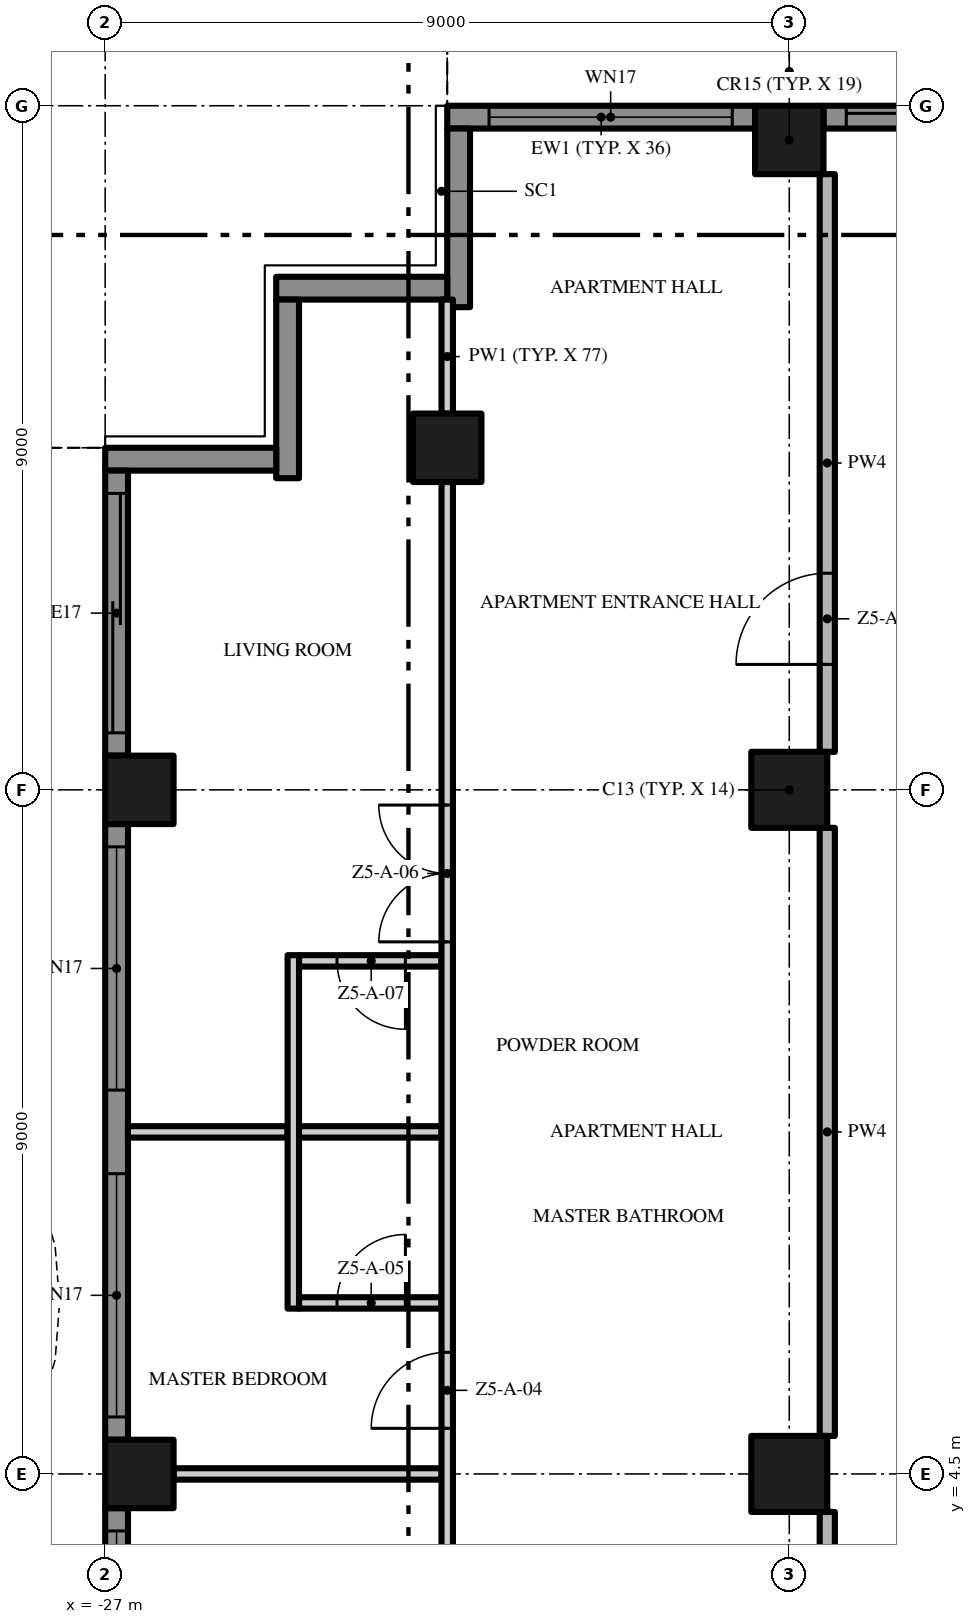
"""IFC4 building model, lengths in metres.
Left out: names, types, materials, properties, quantities, classifications, styles, units other than length and angle.
Written with IfcOpenShell. Run it as: python <this file> out.ifc"""

import sys

from ifc_helpers import new_model, si_unit, direction, frame, frame_2d, origin, origin_2d, place, context, subcontext, project, spatial, polyline, rectangle, outline, extrude, element, fill, save


model = new_model("IFC4")
c1 = context("Model", 3, precision=1e-05, world=origin(), true_north=direction((0.0, 1.0)))
c2 = subcontext(c1, "Body", "Model", "MODEL_VIEW")
j1 = project(units=[si_unit("LENGTHUNIT", "METRE"), si_unit("PLANEANGLEUNIT", "RADIAN")], contexts=[c1])
p1 = place(None, origin())
s1 = spatial("IfcSite", under=j1, at=p1, CompositionType="ELEMENT")
p2 = place(p1, origin())
s2 = spatial("IfcBuilding", under=s1, at=p2, CompositionType="ELEMENT")
p3 = place(p2, frame((0.0, 0.0, 242.6)))
s3 = spatial("IfcBuildingStorey", under=s2, at=p3, CompositionType="ELEMENT", Elevation=242.6)
p4 = place(p3, frame((-18.0, 13.5, 0.0), z_axis=(0.0, 0.0, 1.0), x_axis=(1.0, 0.0, 0.0)))
e1 = element("IfcColumn", 1, at=p4, inside=s3, PredefinedType="COLUMN", context=c2, shape_type="SweptSolid", body=[
    extrude(rectangle(XDim=1.0, YDim=1.0, at=origin_2d()), origin(), (0.0, 0.0, 1.0), 3.5),
])
p5 = place(p3, frame((-18.0, 22.05, 0.0), z_axis=(0.0, 0.0, 1.0), x_axis=(1.0, 0.0, 0.0)))
e2 = element("IfcColumn", 2, at=p5, inside=s3, PredefinedType="COLUMN", context=c2, shape_type="SweptSolid", body=[
    extrude(rectangle(XDim=0.9, YDim=0.9, at=origin_2d()), origin(), (0.0, 0.0, 1.0), 3.5),
])
p6 = place(p3, frame((-18.0, 4.5, 0.0), z_axis=(0.0, 0.0, 1.0), x_axis=(1.0, 0.0, 0.0)))
e3 = element("IfcColumn", 3, at=p6, inside=s3, PredefinedType="COLUMN", context=c2, shape_type="SweptSolid", body=[
    extrude(rectangle(XDim=1.0, YDim=1.0, at=origin_2d()), origin(), (0.0, 0.0, 1.0), 3.5),
])
for number, where, z_axis, x_axis in (
    (4, (-26.55, 13.5, 0.0), (0.0, 0.0, 1.0), (1.0, 0.0, 0.0)),
    (5, (-22.5, 18.0, 0.0), (0.0, 0.0, 1.0), (1.0, 0.0, 0.0)),
    (6, (-26.55, 4.5, 0.0), (0.0, 0.0, 1.0), (1.0, 0.0, 0.0)),
):
    element("IfcColumn", number, at=place(p3, frame(where, z_axis=z_axis, x_axis=x_axis)), inside=s3, PredefinedType="COLUMN", context=c2, shape_type="SweptSolid", body=[
        extrude(rectangle(XDim=0.9, YDim=0.9, at=origin_2d()), origin(), (0.0, 0.0, 1.0), 3.5),
    ])
p7 = place(p3, frame((-17.55, 22.35, 0.0), z_axis=(0.0, 0.0, 1.0), x_axis=(1.0, 0.0, 0.0)))
e7 = element("IfcWall", 7, at=p7, inside=s3, PredefinedType="SOLIDWALL", context=c2, shape_type="SweptSolid", body=[
    extrude(rectangle(XDim=4.05, YDim=0.3, at=frame_2d((2.025, 0.0))), origin(), (0.0, 0.0, 1.0), 3.5),
])
p8 = place(p7, frame((0.3, 0.0, 0.0)))
e8 = element("IfcOpeningElement", 8, at=p8, cuts=e7, PredefinedType="OPENING", context=c2, shape_type="SweptSolid", body=[
    extrude(rectangle(XDim=3.2, YDim=2.4, at=frame_2d((1.6, 1.2))), frame((0.0, 0.16, 0.0), z_axis=(0.0, -1.0, 0.0), x_axis=(1.0, 0.0, 0.0)), (0.0, 0.0, 1.0), 0.32),
])
p9 = place(p3, frame((-22.5, 22.35, 0.0), z_axis=(0.0, 0.0, 1.0), x_axis=(1.0, 0.0, 0.0)))
e9 = element("IfcWall", 9, at=p9, inside=s3, PredefinedType="SOLIDWALL", context=c2, shape_type="SweptSolid", body=[
    extrude(rectangle(XDim=4.05, YDim=0.3, at=frame_2d((2.025, 0.0))), origin(), (0.0, 0.0, 1.0), 3.5),
])
p10 = place(p9, frame((0.55, 0.0, 0.45)))
e10 = element("IfcOpeningElement", 10, at=p10, cuts=e9, PredefinedType="OPENING", context=c2, shape_type="SweptSolid", body=[
    extrude(rectangle(XDim=3.2, YDim=2.65, at=frame_2d((1.6, 1.325))), frame((0.0, 0.16, 0.0), z_axis=(0.0, -1.0, 0.0), x_axis=(1.0, 0.0, 0.0)), (0.0, 0.0, 1.0), 0.32),
])
p11 = place(p3, frame((-22.35, 19.85, 0.0), z_axis=(0.0, 0.0, 1.0), x_axis=(0.0, 1.0, 0.0)))
e11 = element("IfcWall", 11, at=p11, inside=s3, PredefinedType="SOLIDWALL", context=c2, shape_type="SweptSolid", body=[
    extrude(rectangle(XDim=2.35, YDim=0.3, at=frame_2d((1.175, 0.0))), origin(), (0.0, 0.0, 1.0), 3.5),
])
p12 = place(p3, frame((-24.75, 20.1, 0.0), z_axis=(0.0, 0.0, 1.0), x_axis=(1.0, 0.0, 0.0)))
e12 = element("IfcWall", 12, at=p12, inside=s3, PredefinedType="SOLIDWALL", context=c2, shape_type="SweptSolid", body=[
    extrude(rectangle(XDim=2.25, YDim=0.3, at=frame_2d((1.125, 0.0))), origin(), (0.0, 0.0, 1.0), 3.5),
])
p13 = place(p3, frame((-24.6, 17.6, 0.0), z_axis=(0.0, 0.0, 1.0), x_axis=(0.0, 1.0, 0.0)))
e13 = element("IfcWall", 13, at=p13, inside=s3, PredefinedType="SOLIDWALL", context=c2, shape_type="SweptSolid", body=[
    extrude(rectangle(XDim=2.35, YDim=0.3, at=frame_2d((1.175, 0.0))), origin(), (0.0, 0.0, 1.0), 3.5),
])
p14 = place(p3, frame((-27.0, 17.85, 0.0), z_axis=(0.0, 0.0, 1.0), x_axis=(1.0, 0.0, 0.0)))
e14 = element("IfcWall", 14, at=p14, inside=s3, PredefinedType="SOLIDWALL", context=c2, shape_type="SweptSolid", body=[
    extrude(rectangle(XDim=2.25, YDim=0.3, at=frame_2d((1.125, 0.0))), origin(), (0.0, 0.0, 1.0), 3.5),
])
p15 = place(p3, frame((-26.85, 13.95, 0.0), z_axis=(0.0, 0.0, 1.0), x_axis=(0.0, 1.0, 0.0)))
e15 = element("IfcWall", 15, at=p15, inside=s3, PredefinedType="SOLIDWALL", context=c2, shape_type="SweptSolid", body=[
    extrude(rectangle(XDim=3.75, YDim=0.3, at=frame_2d((1.875, 0.0))), origin(), (0.0, 0.0, 1.0), 3.5),
])
p16 = place(p15, frame((0.3, 0.0, 0.0)))
e16 = element("IfcOpeningElement", 16, at=p16, cuts=e15, PredefinedType="OPENING", context=c2, shape_type="SweptSolid", body=[
    extrude(rectangle(XDim=3.15, YDim=2.4, at=frame_2d((1.575, 1.2))), frame((0.0, 0.16, 0.0), z_axis=(0.0, -1.0, 0.0), x_axis=(1.0, 0.0, 0.0)), (0.0, 0.0, 1.0), 0.32),
])
p17 = place(p3, frame((-26.85, 4.95, 0.0), z_axis=(0.0, 0.0, 1.0), x_axis=(0.0, 1.0, 0.0)))
e17 = element("IfcWall", 17, at=p17, inside=s3, PredefinedType="SOLIDWALL", context=c2, shape_type="SweptSolid", body=[
    extrude(rectangle(XDim=8.1, YDim=0.3, at=frame_2d((4.05, 0.0))), origin(), (0.0, 0.0, 1.0), 3.5),
])
p18 = place(p17, frame((4.6, 0.0, 0.45)))
e18 = element("IfcOpeningElement", 18, at=p18, cuts=e17, PredefinedType="OPENING", context=c2, shape_type="SweptSolid", body=[
    extrude(rectangle(XDim=3.2, YDim=2.65, at=frame_2d((1.6, 1.325))), frame((0.0, 0.16, 0.0), z_axis=(0.0, -1.0, 0.0), x_axis=(1.0, 0.0, 0.0)), (0.0, 0.0, 1.0), 0.32),
])
p19 = place(p17, frame((0.3, 0.0, 0.45)))
e19 = element("IfcOpeningElement", 19, at=p19, cuts=e17, PredefinedType="OPENING", context=c2, shape_type="SweptSolid", body=[
    extrude(rectangle(XDim=3.2, YDim=2.65, at=frame_2d((1.6, 1.325))), frame((0.0, 0.16, 0.0), z_axis=(0.0, -1.0, 0.0), x_axis=(1.0, 0.0, 0.0)), (0.0, 0.0, 1.0), 0.32),
])
p20 = place(p3, frame((-26.85, -4.05, 0.0), z_axis=(0.0, 0.0, 1.0), x_axis=(0.0, 1.0, 0.0)))
e20 = element("IfcWall", 20, at=p20, inside=s3, PredefinedType="SOLIDWALL", context=c2, shape_type="SweptSolid", body=[
    extrude(rectangle(XDim=8.1, YDim=0.3, at=frame_2d((4.05, 0.0))), origin(), (0.0, 0.0, 1.0), 3.5),
])
p21 = place(p20, frame((4.6, 0.0, 0.45)))
e21 = element("IfcOpeningElement", 21, at=p21, cuts=e20, PredefinedType="OPENING", context=c2, shape_type="SweptSolid", body=[
    extrude(rectangle(XDim=3.2, YDim=2.65, at=frame_2d((1.6, 1.325))), frame((0.0, 0.16, 0.0), z_axis=(0.0, -1.0, 0.0), x_axis=(1.0, 0.0, 0.0)), (0.0, 0.0, 1.0), 0.32),
])
p22 = place(p20, frame((0.3, 0.0, 0.0)))
e22 = element("IfcOpeningElement", 22, at=p22, cuts=e20, PredefinedType="OPENING", context=c2, shape_type="SweptSolid", body=[
    extrude(rectangle(XDim=3.2, YDim=2.4, at=frame_2d((1.6, 1.2))), frame((0.0, 0.16, 0.0), z_axis=(0.0, -1.0, 0.0), x_axis=(1.0, 0.0, 0.0)), (0.0, 0.0, 1.0), 0.32),
])
p23 = place(p3, origin())
e23 = element("IfcWall", 23, at=p23, inside=s3, PredefinedType="USERDEFINED", context=c2, shape_type="SweptSolid", body=[
    extrude(outline(polyline([(-28.8, 18.0), (-29.505, 16.5), (-29.941, 15.0), (-30.0, 14.25), (-29.941, 13.5), (-29.505, 12.0), (-28.8, 10.5), (-28.095, 9.0), (-27.659, 7.5), (-27.6, 6.75), (-27.659, 6.0), (-28.095, 4.5), (-28.8, 3.0), (-29.505, 1.5), (-29.941, 0.0), (-30.0, -0.75), (-29.941, -1.5), (-29.505, -3.0), (-28.8, -4.5), (-28.095, -6.0), (-27.659, -7.5), (-27.6, -8.25), (-27.659, -9.0), (-28.095, -10.5), (-28.8, -12.0), (-29.505, -13.5), (-29.941, -15.0), (-30.0, -15.75), (-29.941, -16.5), (-29.505, -18.0), (-29.265, -17.93), (-29.694, -16.455), (-29.749, -15.75), (-29.694, -15.045), (-29.271, -13.589), (-28.574, -12.106), (-27.86, -10.589), (-27.411, -9.045), (-27.349, -8.25), (-27.411, -7.455), (-27.86, -5.911), (-28.574, -4.394), (-29.271, -2.911), (-29.694, -1.455), (-29.749, -0.75), (-29.694, -0.045), (-29.271, 1.411), (-28.574, 2.894), (-27.86, 4.411), (-27.411, 5.955), (-27.349, 6.75), (-27.411, 7.545), (-27.86, 9.089), (-28.574, 10.606), (-29.271, 12.089), (-29.694, 13.545), (-29.749, 14.25), (-29.694, 14.955), (-29.271, 16.411), (-28.574, 17.894), (-28.8, 18.0)])), origin(), (0.0, 0.0, 1.0), 0.9),
])
p24 = place(p3, frame((-26.1, 4.5, 0.0), z_axis=(0.0, 0.0, 1.0), x_axis=(1.0, 0.0, 0.0)))
e24 = element("IfcWall", 24, at=p24, inside=s3, PredefinedType="PARTITIONING", context=c2, shape_type="SweptSolid", body=[
    extrude(rectangle(XDim=3.525, YDim=0.15, at=frame_2d((1.762, 0.0))), origin(), (0.0, 0.0, 1.0), 3.5),
])
p25 = place(p3, frame((-24.45, 6.75, 0.0), z_axis=(0.0, 0.0, 1.0), x_axis=(1.0, 0.0, 0.0)))
e25 = element("IfcWall", 25, at=p25, inside=s3, PredefinedType="PARTITIONING", context=c2, shape_type="SweptSolid", body=[
    extrude(rectangle(XDim=1.875, YDim=0.15, at=frame_2d((0.938, 0.0))), origin(), (0.0, 0.0, 1.0), 3.5),
])
p26 = place(p25, frame((0.5, 0.0, 0.0)))
e26 = element("IfcOpeningElement", 26, at=p26, cuts=e25, PredefinedType="OPENING", context=c2, shape_type="SweptSolid", body=[
    extrude(rectangle(XDim=0.9, YDim=2.1, at=frame_2d((0.45, 1.05))), frame((0.0, 0.085, 0.0), z_axis=(0.0, -1.0, 0.0), x_axis=(1.0, 0.0, 0.0)), (0.0, 0.0, 1.0), 0.17),
])
p27 = place(p3, frame((-26.7, 9.0, 0.0), z_axis=(0.0, 0.0, 1.0), x_axis=(1.0, 0.0, 0.0)))
e27 = element("IfcWall", 27, at=p27, inside=s3, PredefinedType="PARTITIONING", context=c2, shape_type="SweptSolid", body=[
    extrude(rectangle(XDim=2.1, YDim=0.15, at=frame_2d((1.05, 0.0))), origin(), (0.0, 0.0, 1.0), 3.5),
])
p28 = place(p3, frame((-24.45, 9.0, 0.0), z_axis=(0.0, 0.0, 1.0), x_axis=(1.0, 0.0, 0.0)))
e28 = element("IfcWall", 28, at=p28, inside=s3, PredefinedType="PARTITIONING", context=c2, shape_type="SweptSolid", body=[
    extrude(rectangle(XDim=1.875, YDim=0.15, at=frame_2d((0.938, 0.0))), origin(), (0.0, 0.0, 1.0), 3.5),
])
p29 = place(p3, frame((-22.575, 11.25, 0.0), z_axis=(0.0, 0.0, 1.0), x_axis=(-1.0, 0.0, 0.0)))
e29 = element("IfcWall", 29, at=p29, inside=s3, PredefinedType="PARTITIONING", context=c2, shape_type="SweptSolid", body=[
    extrude(rectangle(XDim=1.875, YDim=0.15, at=frame_2d((0.938, 0.0))), origin(), (0.0, 0.0, 1.0), 3.5),
])
p30 = place(p29, frame((0.475, 0.0, 0.0)))
e30 = element("IfcOpeningElement", 30, at=p30, cuts=e29, PredefinedType="OPENING", context=c2, shape_type="SweptSolid", body=[
    extrude(rectangle(XDim=0.9, YDim=2.1, at=frame_2d((0.45, 1.05))), frame((0.0, 0.085, 0.0), z_axis=(0.0, -1.0, 0.0), x_axis=(1.0, 0.0, 0.0)), (0.0, 0.0, 1.0), 0.17),
])
p31 = place(p3, frame((-24.525, 6.675, 0.0), z_axis=(0.0, 0.0, 1.0), x_axis=(0.0, 1.0, 0.0)))
e31 = element("IfcWall", 31, at=p31, inside=s3, PredefinedType="PARTITIONING", context=c2, shape_type="SweptSolid", body=[
    extrude(rectangle(XDim=4.65, YDim=0.15, at=frame_2d((2.325, 0.0))), origin(), (0.0, 0.0, 1.0), 3.5),
])
p32 = place(p3, frame((-22.5, 0.1, 0.0), z_axis=(0.0, 0.0, 1.0), x_axis=(0.0, 1.0, 0.0)))
e32 = element("IfcWall", 32, at=p32, inside=s3, PredefinedType="PARTITIONING", context=c2, shape_type="SweptSolid", body=[
    extrude(rectangle(XDim=17.45, YDim=0.15, at=frame_2d((8.725, 0.0))), origin(), (0.0, 0.0, 1.0), 3.5),
])
p33 = place(p32, frame((1.65, 0.0, 0.0)))
e33 = element("IfcOpeningElement", 33, at=p33, cuts=e32, PredefinedType="OPENING", context=c2, shape_type="SweptSolid", body=[
    extrude(rectangle(XDim=1.0, YDim=2.4, at=frame_2d((0.5, 1.2))), frame((0.0, 0.085, 0.0), z_axis=(0.0, -1.0, 0.0), x_axis=(1.0, 0.0, 0.0)), (0.0, 0.0, 1.0), 0.17),
])
p34 = place(p32, frame((5.0, 0.0, 0.0)))
e34 = element("IfcOpeningElement", 34, at=p34, cuts=e32, PredefinedType="OPENING", context=c2, shape_type="SweptSolid", body=[
    extrude(rectangle(XDim=1.0, YDim=2.4, at=frame_2d((0.5, 1.2))), frame((0.0, 0.085, 0.0), z_axis=(0.0, -1.0, 0.0), x_axis=(1.0, 0.0, 0.0)), (0.0, 0.0, 1.0), 0.17),
])
p35 = place(p32, frame((11.4, 0.0, 0.0)))
e35 = element("IfcOpeningElement", 35, at=p35, cuts=e32, PredefinedType="OPENING", context=c2, shape_type="SweptSolid", body=[
    extrude(rectangle(XDim=1.8, YDim=2.4, at=frame_2d((0.9, 1.2))), frame((0.0, 0.085, 0.0), z_axis=(0.0, -1.0, 0.0), x_axis=(1.0, 0.0, 0.0)), (0.0, 0.0, 1.0), 0.17),
])
p36 = place(p3, frame((-22.5, 18.45, 0.0), z_axis=(0.0, 0.0, 1.0), x_axis=(0.0, 1.0, 0.0)))
e36 = element("IfcWall", 36, at=p36, inside=s3, PredefinedType="PARTITIONING", context=c2, shape_type="SweptSolid", body=[
    extrude(rectangle(XDim=1.5, YDim=0.15, at=frame_2d((0.75, 0.0))), origin(), (0.0, 0.0, 1.0), 3.5),
])
p37 = place(p3, frame((-17.5, -0.2, 0.0), z_axis=(0.0, 0.0, 1.0), x_axis=(0.0, 1.0, 0.0)))
e37 = element("IfcWall", 37, at=p37, inside=s3, PredefinedType="PARTITIONING", context=c2, shape_type="SweptSolid", body=[
    extrude(rectangle(XDim=4.2, YDim=0.2, at=frame_2d((2.1, 0.0))), origin(), (0.0, 0.0, 1.0), 3.5),
])
p38 = place(p3, frame((-17.5, 5.0, 0.0), z_axis=(0.0, 0.0, 1.0), x_axis=(0.0, 1.0, 0.0)))
e38 = element("IfcWall", 38, at=p38, inside=s3, PredefinedType="PARTITIONING", context=c2, shape_type="SweptSolid", body=[
    extrude(rectangle(XDim=8.0, YDim=0.2, at=frame_2d((4.0, 0.0))), origin(), (0.0, 0.0, 1.0), 3.5),
])
p39 = place(p3, frame((-17.5, 14.0, 0.0), z_axis=(0.0, 0.0, 1.0), x_axis=(0.0, 1.0, 0.0)))
e39 = element("IfcWall", 39, at=p39, inside=s3, PredefinedType="PARTITIONING", context=c2, shape_type="SweptSolid", body=[
    extrude(rectangle(XDim=7.6, YDim=0.2, at=frame_2d((3.8, 0.0))), origin(), (0.0, 0.0, 1.0), 3.5),
])
p40 = place(p39, frame((1.15, 0.0, 0.0)))
e40 = element("IfcOpeningElement", 40, at=p40, cuts=e39, PredefinedType="OPENING", context=c2, shape_type="SweptSolid", body=[
    extrude(rectangle(XDim=1.2, YDim=2.4, at=frame_2d((0.6, 1.2))), frame((0.0, 0.11, 0.0), z_axis=(0.0, -1.0, 0.0), x_axis=(1.0, 0.0, 0.0)), (0.0, 0.0, 1.0), 0.22),
])
p41 = place(p8, origin())
e41 = element("IfcDoor", 41, at=p41, inside=s3, OperationType="SINGLE_SWING_LEFT", PredefinedType="DOOR", context=c2, shape_type="SweptSolid", body=[
    extrude(rectangle(XDim=3.2, YDim=2.4, at=frame_2d((1.6, 1.2))), frame((0.0, 0.025, 0.0), z_axis=(0.0, -1.0, 0.0), x_axis=(1.0, 0.0, 0.0)), (0.0, 0.0, 1.0), 0.05),
])
fill(e8, e41)
p42 = place(p10, origin())
e42 = element("IfcWindow", 42, at=p42, inside=s3, PartitioningType="SINGLE_PANEL", PredefinedType="WINDOW", context=c2, shape_type="SweptSolid", body=[
    extrude(rectangle(XDim=3.2, YDim=2.65, at=frame_2d((1.6, 1.325))), frame((0.0, 0.03, 0.0), z_axis=(0.0, -1.0, 0.0), x_axis=(1.0, 0.0, 0.0)), (0.0, 0.0, 1.0), 0.06),
])
fill(e10, e42)
p43 = place(p16, origin())
e43 = element("IfcDoor", 43, at=p43, inside=s3, OperationType="SINGLE_SWING_LEFT", PredefinedType="DOOR", context=c2, shape_type="SweptSolid", body=[
    extrude(rectangle(XDim=3.15, YDim=2.4, at=frame_2d((1.575, 1.2))), frame((0.0, 0.025, 0.0), z_axis=(0.0, -1.0, 0.0), x_axis=(1.0, 0.0, 0.0)), (0.0, 0.0, 1.0), 0.05),
])
fill(e16, e43)
p44 = place(p18, origin())
e44 = element("IfcWindow", 44, at=p44, inside=s3, PartitioningType="SINGLE_PANEL", PredefinedType="WINDOW", context=c2, shape_type="SweptSolid", body=[
    extrude(rectangle(XDim=3.2, YDim=2.65, at=frame_2d((1.6, 1.325))), frame((0.0, 0.03, 0.0), z_axis=(0.0, -1.0, 0.0), x_axis=(1.0, 0.0, 0.0)), (0.0, 0.0, 1.0), 0.06),
])
fill(e18, e44)
p45 = place(p19, origin())
e45 = element("IfcWindow", 45, at=p45, inside=s3, PartitioningType="SINGLE_PANEL", PredefinedType="WINDOW", context=c2, shape_type="SweptSolid", body=[
    extrude(rectangle(XDim=3.2, YDim=2.65, at=frame_2d((1.6, 1.325))), frame((0.0, 0.03, 0.0), z_axis=(0.0, -1.0, 0.0), x_axis=(1.0, 0.0, 0.0)), (0.0, 0.0, 1.0), 0.06),
])
fill(e19, e45)
p46 = place(p21, origin())
e46 = element("IfcWindow", 46, at=p46, inside=s3, PartitioningType="SINGLE_PANEL", PredefinedType="WINDOW", context=c2, shape_type="SweptSolid", body=[
    extrude(rectangle(XDim=3.2, YDim=2.65, at=frame_2d((1.6, 1.325))), frame((0.0, 0.03, 0.0), z_axis=(0.0, -1.0, 0.0), x_axis=(1.0, 0.0, 0.0)), (0.0, 0.0, 1.0), 0.06),
])
fill(e21, e46)
p47 = place(p40, origin())
e47 = element("IfcDoor", 47, at=p47, inside=s3, OperationType="SINGLE_SWING_LEFT", PredefinedType="DOOR", context=c2, shape_type="SweptSolid", body=[
    extrude(rectangle(XDim=1.2, YDim=2.4, at=frame_2d((0.6, 1.2))), frame((0.0, 0.025, 0.0), z_axis=(0.0, -1.0, 0.0), x_axis=(1.0, 0.0, 0.0)), (0.0, 0.0, 1.0), 0.05),
])
fill(e40, e47)
p48 = place(p34, origin())
e48 = element("IfcDoor", 48, at=p48, inside=s3, OperationType="SINGLE_SWING_LEFT", PredefinedType="DOOR", context=c2, shape_type="SweptSolid", body=[
    extrude(rectangle(XDim=1.0, YDim=2.4, at=frame_2d((0.5, 1.2))), frame((0.0, 0.025, 0.0), z_axis=(0.0, -1.0, 0.0), x_axis=(1.0, 0.0, 0.0)), (0.0, 0.0, 1.0), 0.05),
])
fill(e34, e48)
p49 = place(p26, origin())
e49 = element("IfcDoor", 49, at=p49, inside=s3, OperationType="SINGLE_SWING_RIGHT", PredefinedType="DOOR", context=c2, shape_type="SweptSolid", body=[
    extrude(rectangle(XDim=0.9, YDim=2.1, at=frame_2d((0.45, 1.05))), frame((0.0, 0.025, 0.0), z_axis=(0.0, -1.0, 0.0), x_axis=(1.0, 0.0, 0.0)), (0.0, 0.0, 1.0), 0.05),
])
fill(e26, e49)
p50 = place(p35, origin())
e50 = element("IfcDoor", 50, at=p50, inside=s3, OperationType="DOUBLE_DOOR_SINGLE_SWING", PredefinedType="DOOR", context=c2, shape_type="SweptSolid", body=[
    extrude(rectangle(XDim=1.8, YDim=2.4, at=frame_2d((0.9, 1.2))), frame((0.0, 0.025, 0.0), z_axis=(0.0, -1.0, 0.0), x_axis=(1.0, 0.0, 0.0)), (0.0, 0.0, 1.0), 0.05),
])
fill(e35, e50)
p51 = place(p30, origin())
e51 = element("IfcDoor", 51, at=p51, inside=s3, OperationType="SINGLE_SWING_LEFT", PredefinedType="DOOR", context=c2, shape_type="SweptSolid", body=[
    extrude(rectangle(XDim=0.9, YDim=2.1, at=frame_2d((0.45, 1.05))), frame((0.0, 0.025, 0.0), z_axis=(0.0, -1.0, 0.0), x_axis=(1.0, 0.0, 0.0)), (0.0, 0.0, 1.0), 0.05),
])
fill(e30, e51)
save(model, sys.argv[1])
